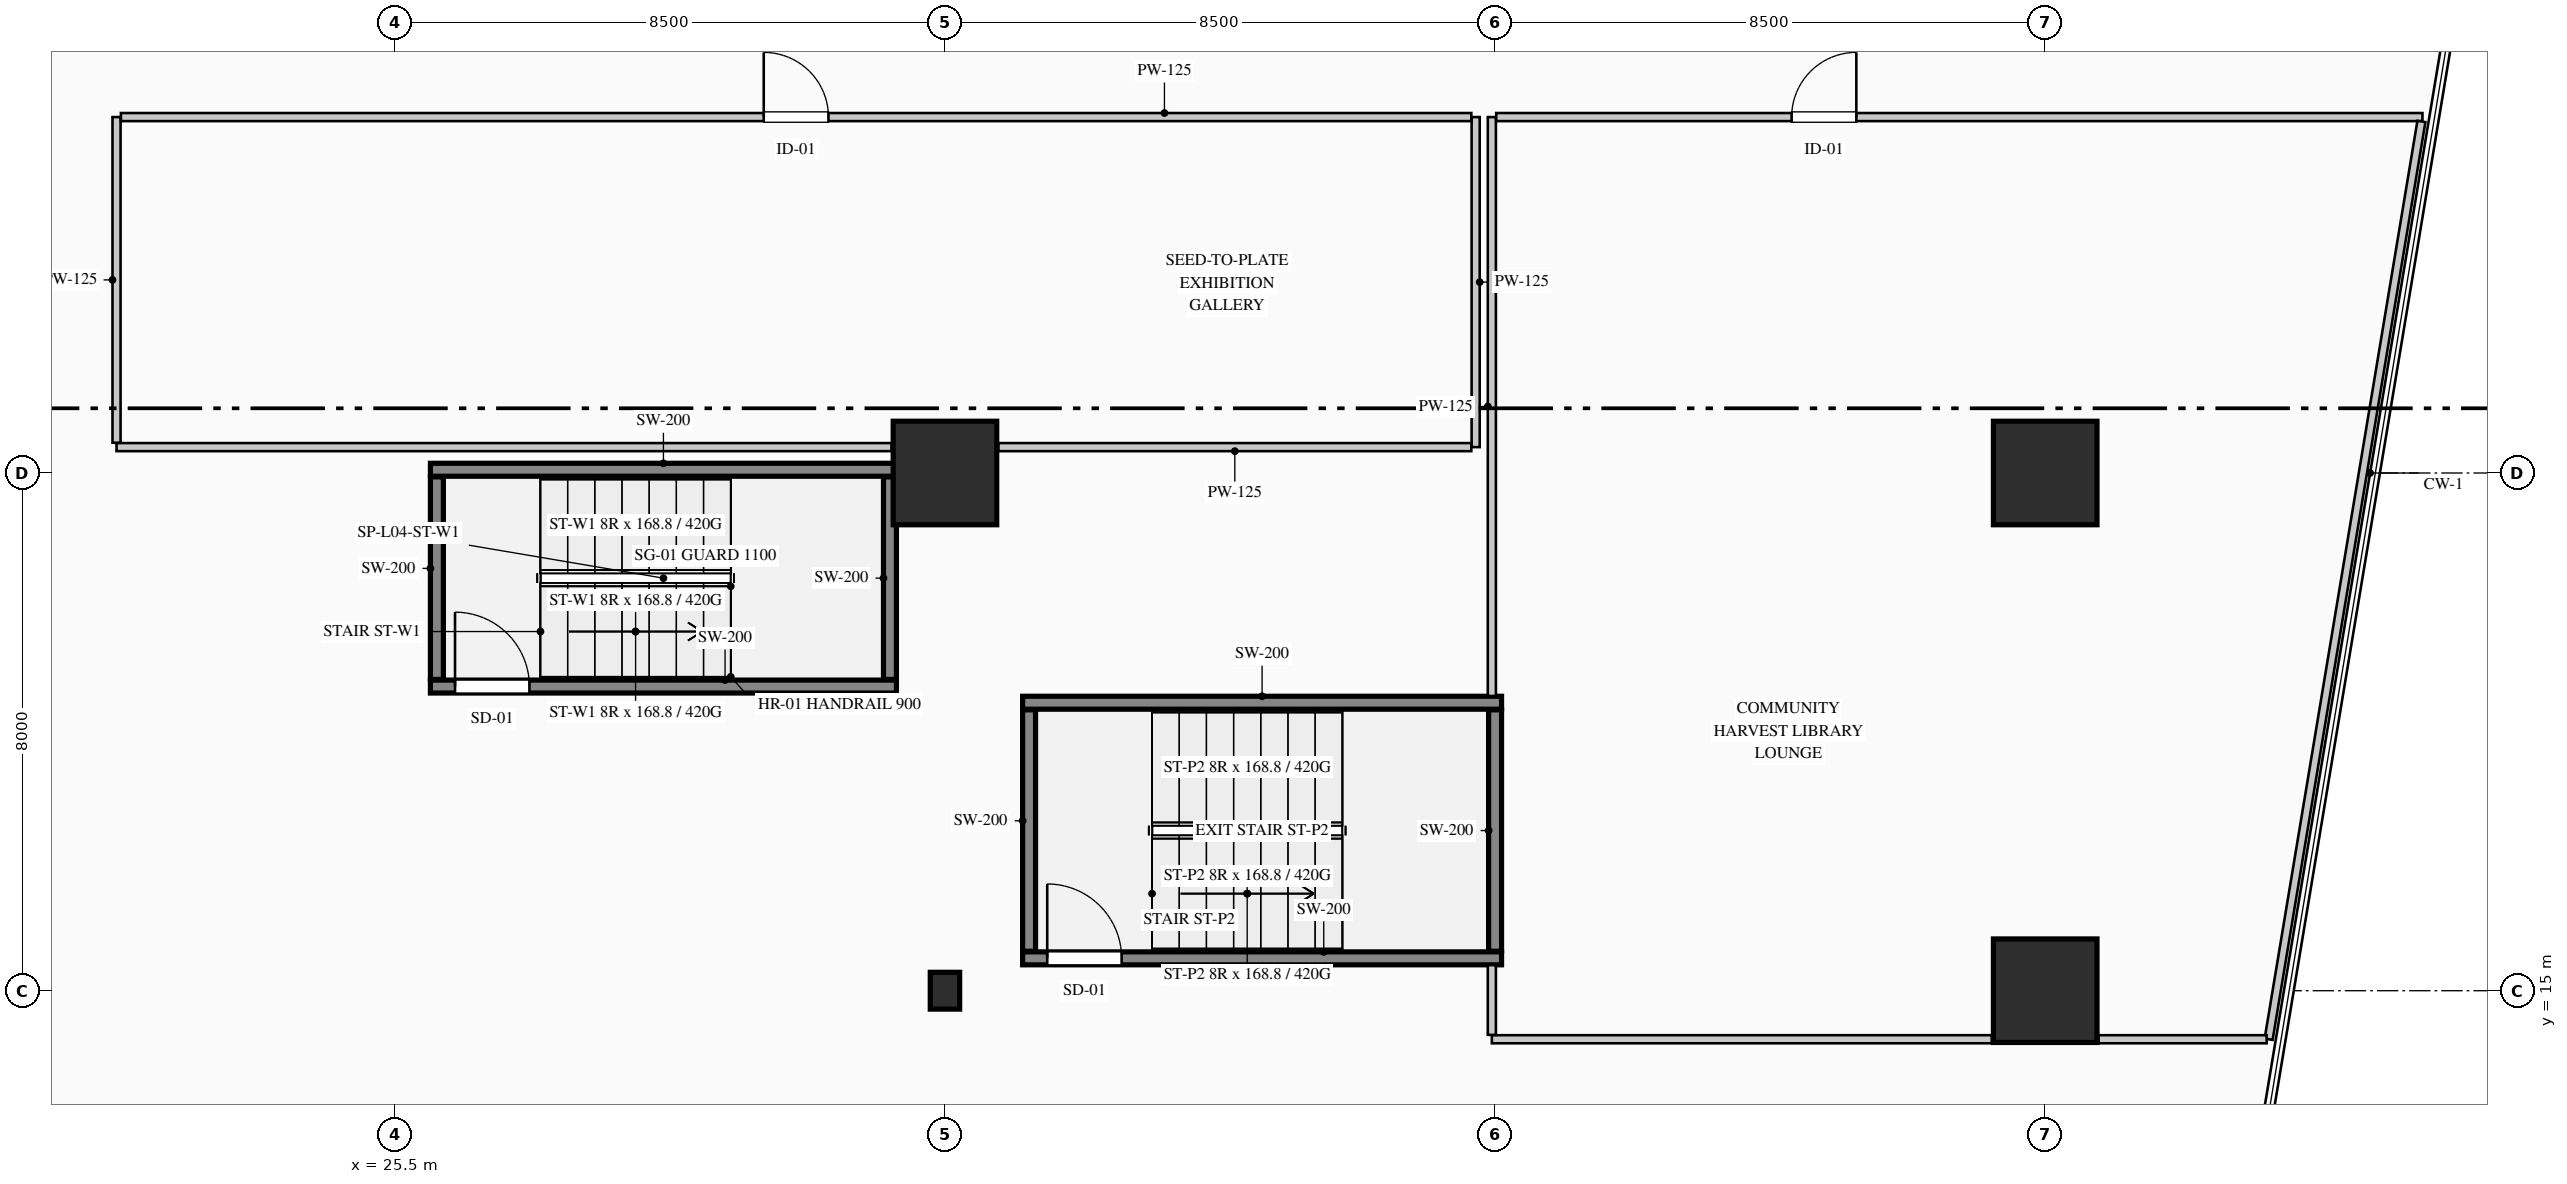
"""IFC4 building model, lengths in metres.
Left out: names, types, materials, properties, quantities, classifications, styles, units other than length and angle.
Written with IfcOpenShell. Run it as: python <this file> out.ifc"""

import sys

from ifc_helpers import new_model, si_unit, direction, frame, frame_2d, origin, origin_2d, place, context, subcontext, project, spatial, rectangle, i_section, extrude, element, fill, save


model = new_model("IFC4")
c1 = context("Model", 3, precision=1e-05, world=origin(), true_north=direction((0.0, 1.0)))
c2 = subcontext(c1, "Body", "Model", "MODEL_VIEW")
j1 = project(units=[si_unit("LENGTHUNIT", "METRE"), si_unit("PLANEANGLEUNIT", "RADIAN")], contexts=[c1])
p1 = place(None, origin())
s1 = spatial("IfcSite", under=j1, at=p1, CompositionType="ELEMENT")
p2 = place(p1, origin())
s2 = spatial("IfcBuilding", under=s1, at=p2, CompositionType="ELEMENT")
p3 = place(p2, frame((0.0, 0.0, 16.2)))
s3 = spatial("IfcBuildingStorey", under=s2, at=p3, CompositionType="ELEMENT", Elevation=16.2)
p4 = place(p3, frame((26.05, 19.7, 0.0), z_axis=(0.0, 0.0, 1.0), x_axis=(1.0, 0.0, 0.0)))
e1 = element("IfcWall", 1, at=p4, inside=s3, PredefinedType="SHEAR", context=c2, shape_type="SweptSolid", body=[
    extrude(rectangle(XDim=7.2, YDim=0.2, at=frame_2d((3.6, 0.0))), origin(), (0.0, 0.0, 1.0), 5.4),
])
p5 = place(p4, frame((0.38, 0.0, 0.0)))
e2 = element("IfcOpeningElement", 2, at=p5, cuts=e1, PredefinedType="OPENING", context=c2, shape_type="SweptSolid", body=[
    extrude(rectangle(XDim=1.15, YDim=2.2, at=frame_2d((0.575, 1.1))), frame((0.0, 0.11, 0.0), z_axis=(0.0, -1.0, 0.0), x_axis=(1.0, 0.0, 0.0)), (0.0, 0.0, 1.0), 0.22),
])
p6 = place(p3, frame((26.05, 23.05, 0.0), z_axis=(0.0, 0.0, 1.0), x_axis=(1.0, 0.0, 0.0)))
e3 = element("IfcWall", 3, at=p6, inside=s3, PredefinedType="SHEAR", context=c2, shape_type="SweptSolid", body=[
    extrude(rectangle(XDim=7.2, YDim=0.2, at=frame_2d((3.6, 0.0))), origin(), (0.0, 0.0, 1.0), 5.4),
])
for number, where, z_axis, x_axis in (
    (4, (26.15, 19.81, 0.0), (0.0, 0.0, 1.0), (0.0, 1.0, 0.0)),
    (5, (33.15, 19.81, 0.0), (0.0, 0.0, 1.0), (0.0, 1.0, 0.0)),
):
    element("IfcWall", number, at=place(p3, frame(where, z_axis=z_axis, x_axis=x_axis)), inside=s3, PredefinedType="SHEAR", context=c2, shape_type="SweptSolid", body=[
        extrude(rectangle(XDim=3.13, YDim=0.2, at=frame_2d((1.565, 0.0))), origin(), (0.0, 0.0, 1.0), 5.4),
    ])
p7 = place(p3, frame((35.2, 15.5, 0.0), z_axis=(0.0, 0.0, 1.0), x_axis=(1.0, 0.0, 0.0)))
e6 = element("IfcWall", 6, at=p7, inside=s3, PredefinedType="SHEAR", context=c2, shape_type="SweptSolid", body=[
    extrude(rectangle(XDim=7.4, YDim=0.2, at=frame_2d((3.7, 0.0))), origin(), (0.0, 0.0, 1.0), 5.4),
])
p8 = place(p7, frame((0.38, 0.0, 0.0)))
e7 = element("IfcOpeningElement", 7, at=p8, cuts=e6, PredefinedType="OPENING", context=c2, shape_type="SweptSolid", body=[
    extrude(rectangle(XDim=1.15, YDim=2.2, at=frame_2d((0.575, 1.1))), frame((0.0, 0.11, 0.0), z_axis=(0.0, -1.0, 0.0), x_axis=(1.0, 0.0, 0.0)), (0.0, 0.0, 1.0), 0.22),
])
p9 = place(p3, frame((35.2, 19.45, 0.0), z_axis=(0.0, 0.0, 1.0), x_axis=(1.0, 0.0, 0.0)))
e8 = element("IfcWall", 8, at=p9, inside=s3, PredefinedType="SHEAR", context=c2, shape_type="SweptSolid", body=[
    extrude(rectangle(XDim=7.4, YDim=0.2, at=frame_2d((3.7, 0.0))), origin(), (0.0, 0.0, 1.0), 5.4),
])
for number, where, z_axis, x_axis in (
    (9, (35.3, 15.61, 0.0), (0.0, 0.0, 1.0), (0.0, 1.0, 0.0)),
    (10, (42.5, 15.61, 0.0), (0.0, 0.0, 1.0), (0.0, 1.0, 0.0)),
):
    element("IfcWall", number, at=place(p3, frame(where, z_axis=z_axis, x_axis=x_axis)), inside=s3, PredefinedType="SHEAR", context=c2, shape_type="SweptSolid", body=[
        extrude(rectangle(XDim=3.73, YDim=0.2, at=frame_2d((1.865, 0.0))), origin(), (0.0, 0.0, 1.0), 5.4),
    ])
p10 = place(p3, frame((34.0, 15.0, 0.0), z_axis=(0.0, 0.0, 1.0), x_axis=(1.0, 0.0, 0.0)))
e11 = element("IfcColumn", 11, at=p10, inside=s3, PredefinedType="COLUMN", context=c2, shape_type="SweptSolid", body=[
    extrude(i_section(OverallWidth=0.454, OverallDepth=0.569, WebThickness=0.078, FlangeThickness=0.08, FilletRadius=0.015, at=origin_2d()), origin(), (0.0, 0.0, 1.0), 5.4),
])
for number, where, z_axis, x_axis in (
    (12, (34.0, 23.0, 0.0), (0.0, 0.0, 1.0), (1.0, 0.0, 0.0)),
    (13, (51.0, 15.0, 0.0), (0.0, 0.0, 1.0), (1.0, 0.0, 0.0)),
    (14, (51.0, 23.0, 0.0), (0.0, 0.0, 1.0), (1.0, 0.0, 0.0)),
):
    element("IfcColumn", number, at=place(p3, frame(where, z_axis=z_axis, x_axis=x_axis)), inside=s3, PredefinedType="COLUMN", context=c2, shape_type="SweptSolid", body=[
        extrude(rectangle(XDim=1.6, YDim=1.6, at=origin_2d()), origin(), (0.0, 0.0, 1.0), 5.4),
    ])
p11 = place(p3, frame((42.2, 28.5, 0.0), z_axis=(0.0, 0.0, 1.0), x_axis=(0.0, -1.0, 0.0)))
e15 = element("IfcWall", 15, at=p11, inside=s3, PredefinedType="PARTITIONING", context=c2, shape_type="SweptSolid", body=[
    extrude(rectangle(XDim=5.1, YDim=0.125, at=frame_2d((2.55, 0.0))), origin(), (0.0, 0.0, 1.0), 5.0),
])
p12 = place(p3, frame((42.133, 23.4, 0.0), z_axis=(0.0, 0.0, 1.0), x_axis=(-1.0, 0.0, 0.0)))
e16 = element("IfcWall", 16, at=p12, inside=s3, PredefinedType="PARTITIONING", context=c2, shape_type="SweptSolid", body=[
    extrude(rectangle(XDim=7.308, YDim=0.125, at=frame_2d((3.654, 0.0))), origin(), (0.0, 0.0, 1.0), 5.0),
])
p13 = place(p3, frame((33.175, 23.4, 0.0), z_axis=(0.0, 0.0, 1.0), x_axis=(-1.0, 0.0, 0.0)))
e17 = element("IfcWall", 17, at=p13, inside=s3, PredefinedType="PARTITIONING", context=c2, shape_type="SweptSolid", body=[
    extrude(rectangle(XDim=11.975, YDim=0.125, at=frame_2d((5.988, 0.0))), origin(), (0.0, 0.0, 1.0), 5.0),
])
p14 = place(p3, frame((21.2, 23.468, 0.0), z_axis=(0.0, 0.0, 1.0), x_axis=(0.0, 1.0, 0.0)))
e18 = element("IfcWall", 18, at=p14, inside=s3, PredefinedType="PARTITIONING", context=c2, shape_type="SweptSolid", body=[
    extrude(rectangle(XDim=5.032, YDim=0.125, at=frame_2d((2.516, 0.0))), origin(), (0.0, 0.0, 1.0), 5.0),
])
p15 = place(p3, frame((21.268, 28.5, 0.0), z_axis=(0.0, 0.0, 1.0), x_axis=(1.0, 0.0, 0.0)))
e19 = element("IfcWall", 19, at=p15, inside=s3, PredefinedType="PARTITIONING", context=c2, shape_type="SweptSolid", body=[
    extrude(rectangle(XDim=20.865, YDim=0.125, at=frame_2d((10.433, 0.0))), origin(), (0.0, 0.0, 1.0), 5.0),
])
p16 = place(p15, frame((9.933, 0.0, 0.0)))
e20 = element("IfcOpeningElement", 20, at=p16, cuts=e19, PredefinedType="OPENING", context=c2, shape_type="SweptSolid", body=[
    extrude(rectangle(XDim=1.0, YDim=2.15, at=frame_2d((0.5, 1.075))), frame((0.0, 0.073, 0.0), z_axis=(0.0, -1.0, 0.0), x_axis=(1.0, 0.0, 0.0)), (0.0, 0.0, 1.0), 0.145),
])
p17 = place(p3, frame((42.45, 19.555, 0.0), z_axis=(0.0, 0.0, 1.0), x_axis=(0.0, 1.0, 0.0)))
e21 = element("IfcWall", 21, at=p17, inside=s3, PredefinedType="PARTITIONING", context=c2, shape_type="SweptSolid", body=[
    extrude(rectangle(XDim=8.945, YDim=0.125, at=frame_2d((4.473, 0.0))), origin(), (0.0, 0.0, 1.0), 5.0),
])
p18 = place(p3, frame((42.518, 28.5, 0.0), z_axis=(0.0, 0.0, 1.0), x_axis=(1.0, 0.0, 0.0)))
e22 = element("IfcWall", 22, at=p18, inside=s3, PredefinedType="PARTITIONING", context=c2, shape_type="SweptSolid", body=[
    extrude(rectangle(XDim=14.311, YDim=0.125, at=frame_2d((7.156, 0.0))), origin(), (0.0, 0.0, 1.0), 5.0),
])
p19 = place(p18, frame((4.564, 0.0, 0.0)))
e23 = element("IfcOpeningElement", 23, at=p19, cuts=e22, PredefinedType="OPENING", context=c2, shape_type="SweptSolid", body=[
    extrude(rectangle(XDim=1.0, YDim=2.15, at=frame_2d((0.5, 1.075))), frame((0.0, 0.073, 0.0), z_axis=(0.0, -1.0, 0.0), x_axis=(1.0, 0.0, 0.0)), (0.0, 0.0, 1.0), 0.145),
])
p20 = place(p3, frame((56.813, 28.433, 0.0), z_axis=(0.0, 0.0, 1.0), x_axis=(-0.16420072603, -0.9864269469, 0.0)))
e24 = element("IfcWall", 24, at=p20, inside=s3, PredefinedType="PARTITIONING", context=c2, shape_type="SweptSolid", body=[
    extrude(rectangle(XDim=14.378, YDim=0.125, at=frame_2d((7.189, 0.0))), origin(), (0.0, 0.0, 1.0), 5.0),
])
p21 = place(p3, frame((54.421, 14.25, 0.0), z_axis=(0.0, 0.0, 1.0), x_axis=(-1.0, 0.0, 0.0)))
e25 = element("IfcWall", 25, at=p21, inside=s3, PredefinedType="PARTITIONING", context=c2, shape_type="SweptSolid", body=[
    extrude(rectangle(XDim=2.596, YDim=0.125, at=frame_2d((1.298, 0.0))), origin(), (0.0, 0.0, 1.0), 5.0),
])
p22 = place(p3, frame((50.175, 14.25, 0.0), z_axis=(0.0, 0.0, 1.0), x_axis=(-1.0, 0.0, 0.0)))
e26 = element("IfcWall", 26, at=p22, inside=s3, PredefinedType="PARTITIONING", context=c2, shape_type="SweptSolid", body=[
    extrude(rectangle(XDim=7.725, YDim=0.125, at=frame_2d((3.863, 0.0))), origin(), (0.0, 0.0, 1.0), 5.0),
])
p23 = place(p3, frame((42.45, 14.317, 0.0), z_axis=(0.0, 0.0, 1.0), x_axis=(0.0, 1.0, 0.0)))
e27 = element("IfcWall", 27, at=p23, inside=s3, PredefinedType="PARTITIONING", context=c2, shape_type="SweptSolid", body=[
    extrude(rectangle(XDim=1.078, YDim=0.125, at=frame_2d((0.539, 0.0))), origin(), (0.0, 0.0, 1.0), 5.0),
])
p24 = place(p5, origin())
e28 = element("IfcDoor", 28, at=p24, inside=s3, OperationType="SINGLE_SWING_LEFT", PredefinedType="DOOR", context=c2, shape_type="SweptSolid", body=[
    extrude(rectangle(XDim=1.15, YDim=2.2, at=frame_2d((0.575, 1.1))), frame((0.0, 0.025, 0.0), z_axis=(0.0, -1.0, 0.0), x_axis=(1.0, 0.0, 0.0)), (0.0, 0.0, 1.0), 0.05),
])
fill(e2, e28)
p25 = place(p8, origin())
e29 = element("IfcDoor", 29, at=p25, inside=s3, OperationType="SINGLE_SWING_LEFT", PredefinedType="DOOR", context=c2, shape_type="SweptSolid", body=[
    extrude(rectangle(XDim=1.15, YDim=2.2, at=frame_2d((0.575, 1.1))), frame((0.0, 0.025, 0.0), z_axis=(0.0, -1.0, 0.0), x_axis=(1.0, 0.0, 0.0)), (0.0, 0.0, 1.0), 0.05),
])
fill(e7, e29)
p26 = place(p16, origin())
e30 = element("IfcDoor", 30, at=p26, inside=s3, OperationType="SINGLE_SWING_LEFT", PredefinedType="DOOR", context=c2, shape_type="SweptSolid", body=[
    extrude(rectangle(XDim=1.0, YDim=2.15, at=frame_2d((0.5, 1.075))), frame((0.0, 0.025, 0.0), z_axis=(0.0, -1.0, 0.0), x_axis=(1.0, 0.0, 0.0)), (0.0, 0.0, 1.0), 0.05),
])
fill(e20, e30)
p27 = place(p19, origin())
e31 = element("IfcDoor", 31, at=p27, inside=s3, OperationType="SINGLE_SWING_RIGHT", PredefinedType="DOOR", context=c2, shape_type="SweptSolid", body=[
    extrude(rectangle(XDim=1.0, YDim=2.15, at=frame_2d((0.5, 1.075))), frame((0.0, 0.025, 0.0), z_axis=(0.0, -1.0, 0.0), x_axis=(1.0, 0.0, 0.0)), (0.0, 0.0, 1.0), 0.05),
])
fill(e23, e31)
save(model, sys.argv[1])
